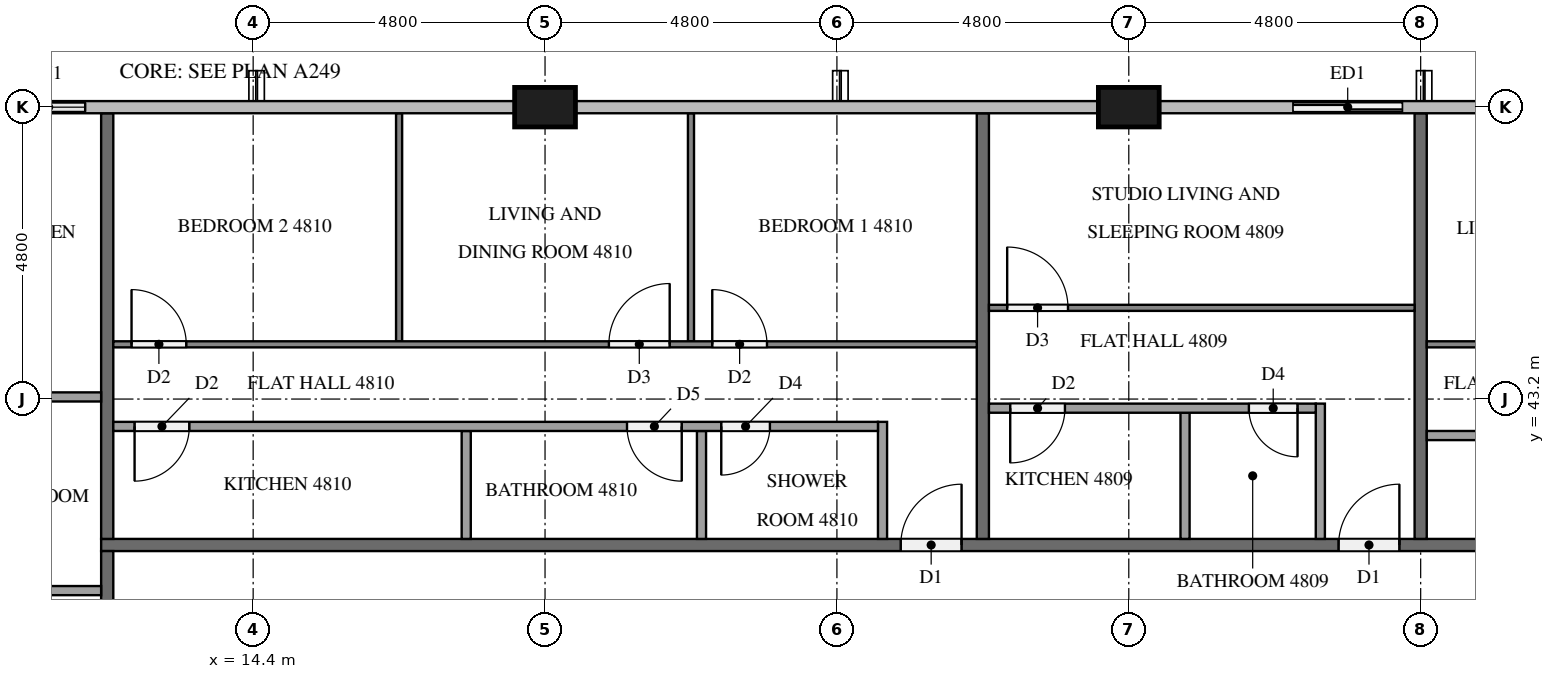
"""IFC4 building model, lengths in metres.
Left out: names, types, materials, properties, quantities, classifications, styles, units other than length and angle.
Written with IfcOpenShell. Run it as: python <this file> out.ifc"""

import sys

from ifc_helpers import new_model, si_unit, direction, frame, frame_2d, origin, origin_2d, place, context, subcontext, project, spatial, rectangle, extrude, element, fill, save


model = new_model("IFC4")
c1 = context("Model", 3, precision=1e-05, world=origin(), true_north=direction((0.0, 1.0)))
c2 = subcontext(c1, "Body", "Model", "MODEL_VIEW")
j1 = project(units=[si_unit("LENGTHUNIT", "METRE"), si_unit("PLANEANGLEUNIT", "RADIAN")], contexts=[c1])
p1 = place(None, origin())
s1 = spatial("IfcSite", under=j1, at=p1, CompositionType="ELEMENT")
p2 = place(p1, origin())
s2 = spatial("IfcBuilding", under=s1, at=p2, CompositionType="ELEMENT")
p3 = place(p2, frame((0.0, 0.0, 185.9)))
s3 = spatial("IfcBuildingStorey", under=s2, at=p3, CompositionType="ELEMENT", Elevation=185.9)
for number, where, z_axis, x_axis in (
    (1, (28.8, 48.0, 0.0), (0.0, 0.0, 1.0), (1.0, 0.0, 0.0)),
    (2, (19.2, 48.0, 0.0), (0.0, 0.0, 1.0), (1.0, 0.0, 0.0)),
):
    element("IfcColumn", number, at=place(p3, frame(where, z_axis=z_axis, x_axis=x_axis)), inside=s3, PredefinedType="COLUMN", context=c2, shape_type="SweptSolid", body=[
        extrude(rectangle(XDim=1.0, YDim=0.65, at=origin_2d()), origin(), (0.0, 0.0, 1.0), 3.2),
    ])
p4 = place(p3, frame((33.6, 48.0, 0.0), z_axis=(0.0, 0.0, 1.0), x_axis=(-1.0, 0.0, 0.0)))
e3 = element("IfcWall", 3, at=p4, inside=s3, PredefinedType="SOLIDWALL", context=c2, shape_type="SweptSolid", body=[
    extrude(rectangle(XDim=2.4, YDim=0.15, at=frame_2d((1.2, 0.0))), origin(), (0.0, 0.0, 1.0), 3.2),
])
p5 = place(p4, frame((0.3, 0.0, 0.0)))
e4 = element("IfcOpeningElement", 4, at=p5, cuts=e3, PredefinedType="OPENING", context=c2, shape_type="SweptSolid", body=[
    extrude(rectangle(XDim=1.8, YDim=2.4, at=frame_2d((0.9, 1.2))), frame((0.0, 0.085, 0.0), z_axis=(0.0, -1.0, 0.0), x_axis=(1.0, 0.0, 0.0)), (0.0, 0.0, 1.0), 0.17),
])
p6 = place(p3, frame((12.0, 48.0, 0.0), z_axis=(0.0, 0.0, 1.0), x_axis=(-1.0, 0.0, 0.0)))
e5 = element("IfcWall", 5, at=p6, inside=s3, PredefinedType="SOLIDWALL", context=c2, shape_type="SweptSolid", body=[
    extrude(rectangle(XDim=1.925, YDim=0.15, at=frame_2d((0.962, 0.0))), origin(), (0.0, 0.0, 1.0), 3.2),
])
p7 = place(p6, frame((0.363, 0.0, 0.9)))
e6 = element("IfcOpeningElement", 6, at=p7, cuts=e5, PredefinedType="OPENING", context=c2, shape_type="SweptSolid", body=[
    extrude(rectangle(XDim=1.2, YDim=1.4, at=frame_2d((0.6, 0.7))), frame((0.0, 0.085, 0.0), z_axis=(0.0, -1.0, 0.0), x_axis=(1.0, 0.0, 0.0)), (0.0, 0.0, 1.0), 0.17),
])
p8 = place(p3, frame((11.9, 40.8, 0.0), z_axis=(0.0, 0.0, 1.0), x_axis=(1.0, 0.0, 0.0)))
e7 = element("IfcWall", 7, at=p8, inside=s3, PredefinedType="PARTITIONING", context=c2, shape_type="SweptSolid", body=[
    extrude(rectangle(XDim=38.6, YDim=0.2, at=frame_2d((19.3, 0.0))), origin(), (0.0, 0.0, 1.0), 3.2),
])
p9 = place(p8, frame((37.15, 0.0, 0.0)))
e8 = element("IfcOpeningElement", 8, at=p9, cuts=e7, PredefinedType="OPENING", context=c2, shape_type="SweptSolid", body=[
    extrude(rectangle(XDim=1.0, YDim=2.1, at=frame_2d((0.5, 1.05))), frame((0.0, 0.11, 0.0), z_axis=(0.0, -1.0, 0.0), x_axis=(1.0, 0.0, 0.0)), (0.0, 0.0, 1.0), 0.22),
])
p10 = place(p8, frame((20.35, 0.0, 0.0)))
e9 = element("IfcOpeningElement", 9, at=p10, cuts=e7, PredefinedType="OPENING", context=c2, shape_type="SweptSolid", body=[
    extrude(rectangle(XDim=1.0, YDim=2.1, at=frame_2d((0.5, 1.05))), frame((0.0, 0.11, 0.0), z_axis=(0.0, -1.0, 0.0), x_axis=(1.0, 0.0, 0.0)), (0.0, 0.0, 1.0), 0.22),
])
p11 = place(p8, frame((13.15, 0.0, 0.0)))
e10 = element("IfcOpeningElement", 10, at=p11, cuts=e7, PredefinedType="OPENING", context=c2, shape_type="SweptSolid", body=[
    extrude(rectangle(XDim=1.0, YDim=2.1, at=frame_2d((0.5, 1.05))), frame((0.0, 0.11, 0.0), z_axis=(0.0, -1.0, 0.0), x_axis=(1.0, 0.0, 0.0)), (0.0, 0.0, 1.0), 0.22),
])
p12 = place(p3, frame((12.0, 12.1, 0.0), z_axis=(0.0, 0.0, 1.0), x_axis=(0.0, 1.0, 0.0)))
e11 = element("IfcWall", 11, at=p12, inside=s3, PredefinedType="PARTITIONING", context=c2, shape_type="SweptSolid", body=[
    extrude(rectangle(XDim=28.6, YDim=0.2, at=frame_2d((14.3, 0.0))), origin(), (0.0, 0.0, 1.0), 3.2),
])
p13 = place(p12, frame((26.65, 0.0, 0.0)))
e12 = element("IfcOpeningElement", 12, at=p13, cuts=e11, PredefinedType="OPENING", context=c2, shape_type="SweptSolid", body=[
    extrude(rectangle(XDim=1.0, YDim=2.1, at=frame_2d((0.5, 1.05))), frame((0.0, 0.11, 0.0), z_axis=(0.0, -1.0, 0.0), x_axis=(1.0, 0.0, 0.0)), (0.0, 0.0, 1.0), 0.22),
])
p14 = place(p12, frame((24.95, 0.0, 0.0)))
e13 = element("IfcOpeningElement", 13, at=p14, cuts=e11, PredefinedType="OPENING", context=c2, shape_type="SweptSolid", body=[
    extrude(rectangle(XDim=1.0, YDim=2.1, at=frame_2d((0.5, 1.05))), frame((0.0, 0.11, 0.0), z_axis=(0.0, -1.0, 0.0), x_axis=(1.0, 0.0, 0.0)), (0.0, 0.0, 1.0), 0.22),
])
p15 = place(p12, frame((12.95, 0.0, 0.0)))
e14 = element("IfcOpeningElement", 14, at=p15, cuts=e11, PredefinedType="OPENING", context=c2, shape_type="SweptSolid", body=[
    extrude(rectangle(XDim=1.0, YDim=2.1, at=frame_2d((0.5, 1.05))), frame((0.0, 0.11, 0.0), z_axis=(0.0, -1.0, 0.0), x_axis=(1.0, 0.0, 0.0)), (0.0, 0.0, 1.0), 0.22),
])
for number, where, z_axis, x_axis in (
    (15, (33.6, 47.9, 0.0), (0.0, 0.0, 1.0), (0.0, -1.0, 0.0)),
    (16, (26.4, 47.9, 0.0), (0.0, 0.0, 1.0), (0.0, -1.0, 0.0)),
    (17, (12.0, 47.9, 0.0), (0.0, 0.0, 1.0), (0.0, -1.0, 0.0)),
):
    element("IfcWall", number, at=place(p3, frame(where, z_axis=z_axis, x_axis=x_axis)), inside=s3, PredefinedType="PARTITIONING", context=c2, shape_type="SweptSolid", body=[
        extrude(rectangle(XDim=7.0, YDim=0.2, at=frame_2d((3.5, 0.0))), origin(), (0.0, 0.0, 1.0), 3.2),
    ])
p16 = place(p3, frame((33.7, 44.1, 0.0), z_axis=(0.0, 0.0, 1.0), x_axis=(1.0, 0.0, 0.0)))
e18 = element("IfcWall", 18, at=p16, inside=s3, PredefinedType="PARTITIONING", context=c2, shape_type="SweptSolid", body=[
    extrude(rectangle(XDim=16.6, YDim=0.1, at=frame_2d((8.3, 0.0))), origin(), (0.0, 0.0, 1.0), 3.2),
])
p17 = place(p16, frame((15.4, 0.0, 0.0)))
e19 = element("IfcOpeningElement", 19, at=p17, cuts=e18, PredefinedType="OPENING", context=c2, shape_type="SweptSolid", body=[
    extrude(rectangle(XDim=0.9, YDim=2.1, at=frame_2d((0.45, 1.05))), frame((0.0, 0.06, 0.0), z_axis=(0.0, -1.0, 0.0), x_axis=(1.0, 0.0, 0.0)), (0.0, 0.0, 1.0), 0.12),
])
p18 = place(p16, frame((7.45, 0.0, 0.0)))
e20 = element("IfcOpeningElement", 20, at=p18, cuts=e18, PredefinedType="OPENING", context=c2, shape_type="SweptSolid", body=[
    extrude(rectangle(XDim=0.9, YDim=2.1, at=frame_2d((0.45, 1.05))), frame((0.0, 0.06, 0.0), z_axis=(0.0, -1.0, 0.0), x_axis=(1.0, 0.0, 0.0)), (0.0, 0.0, 1.0), 0.12),
])
p19 = place(p16, frame((5.75, 0.0, 0.0)))
e21 = element("IfcOpeningElement", 21, at=p19, cuts=e18, PredefinedType="OPENING", context=c2, shape_type="SweptSolid", body=[
    extrude(rectangle(XDim=1.0, YDim=2.1, at=frame_2d((0.5, 1.05))), frame((0.0, 0.06, 0.0), z_axis=(0.0, -1.0, 0.0), x_axis=(1.0, 0.0, 0.0)), (0.0, 0.0, 1.0), 0.12),
])
p20 = place(p3, frame((48.675, 42.6, 0.0), z_axis=(0.0, 0.0, 1.0), x_axis=(-1.0, 0.0, 0.0)))
e22 = element("IfcWall", 22, at=p20, inside=s3, PredefinedType="PARTITIONING", context=c2, shape_type="SweptSolid", body=[
    extrude(rectangle(XDim=14.975, YDim=0.15, at=frame_2d((7.488, 0.0))), origin(), (0.0, 0.0, 1.0), 3.2),
])
p21 = place(p20, frame((0.3, 0.0, 0.0)))
e23 = element("IfcOpeningElement", 23, at=p21, cuts=e22, PredefinedType="OPENING", context=c2, shape_type="SweptSolid", body=[
    extrude(rectangle(XDim=0.8, YDim=2.1, at=frame_2d((0.4, 1.05))), frame((0.0, 0.085, 0.0), z_axis=(0.0, -1.0, 0.0), x_axis=(1.0, 0.0, 0.0)), (0.0, 0.0, 1.0), 0.17),
])
p22 = place(p20, frame((6.838, 0.0, 0.0)))
e24 = element("IfcOpeningElement", 24, at=p22, cuts=e22, PredefinedType="OPENING", context=c2, shape_type="SweptSolid", body=[
    extrude(rectangle(XDim=0.9, YDim=2.1, at=frame_2d((0.45, 1.05))), frame((0.0, 0.085, 0.0), z_axis=(0.0, -1.0, 0.0), x_axis=(1.0, 0.0, 0.0)), (0.0, 0.0, 1.0), 0.17),
])
p23 = place(p20, frame((8.388, 0.0, 0.0)))
e25 = element("IfcOpeningElement", 25, at=p23, cuts=e22, PredefinedType="OPENING", context=c2, shape_type="SweptSolid", body=[
    extrude(rectangle(XDim=0.9, YDim=2.1, at=frame_2d((0.45, 1.05))), frame((0.0, 0.085, 0.0), z_axis=(0.0, -1.0, 0.0), x_axis=(1.0, 0.0, 0.0)), (0.0, 0.0, 1.0), 0.17),
])
p24 = place(p3, frame((26.5, 44.7, 0.0), z_axis=(0.0, 0.0, 1.0), x_axis=(1.0, 0.0, 0.0)))
e26 = element("IfcWall", 26, at=p24, inside=s3, PredefinedType="PARTITIONING", context=c2, shape_type="SweptSolid", body=[
    extrude(rectangle(XDim=7.0, YDim=0.1, at=frame_2d((3.5, 0.0))), origin(), (0.0, 0.0, 1.0), 3.2),
])
p25 = place(p24, frame((0.3, 0.0, 0.0)))
e27 = element("IfcOpeningElement", 27, at=p25, cuts=e26, PredefinedType="OPENING", context=c2, shape_type="SweptSolid", body=[
    extrude(rectangle(XDim=1.0, YDim=2.1, at=frame_2d((0.5, 1.05))), frame((0.0, 0.06, 0.0), z_axis=(0.0, -1.0, 0.0), x_axis=(1.0, 0.0, 0.0)), (0.0, 0.0, 1.0), 0.12),
])
p26 = place(p3, frame((29.725, 40.9, 0.0), z_axis=(0.0, 0.0, 1.0), x_axis=(0.0, 1.0, 0.0)))
e28 = element("IfcWall", 28, at=p26, inside=s3, PredefinedType="PARTITIONING", context=c2, shape_type="SweptSolid", body=[
    extrude(rectangle(XDim=2.075, YDim=0.15, at=frame_2d((1.038, 0.0))), origin(), (0.0, 0.0, 1.0), 3.2),
])
p27 = place(p3, frame((31.95, 40.9, 0.0), z_axis=(0.0, 0.0, 1.0), x_axis=(0.0, 1.0, 0.0)))
e29 = element("IfcWall", 29, at=p27, inside=s3, PredefinedType="PARTITIONING", context=c2, shape_type="SweptSolid", body=[
    extrude(rectangle(XDim=2.225, YDim=0.15, at=frame_2d((1.113, 0.0))), origin(), (0.0, 0.0, 1.0), 3.2),
])
p28 = place(p3, frame((31.875, 43.05, 0.0), z_axis=(0.0, 0.0, 1.0), x_axis=(-1.0, 0.0, 0.0)))
e30 = element("IfcWall", 30, at=p28, inside=s3, PredefinedType="PARTITIONING", context=c2, shape_type="SweptSolid", body=[
    extrude(rectangle(XDim=5.375, YDim=0.15, at=frame_2d((2.688, 0.0))), origin(), (0.0, 0.0, 1.0), 3.2),
])
p29 = place(p28, frame((0.3, 0.0, 0.0)))
e31 = element("IfcOpeningElement", 31, at=p29, cuts=e30, PredefinedType="OPENING", context=c2, shape_type="SweptSolid", body=[
    extrude(rectangle(XDim=0.8, YDim=2.1, at=frame_2d((0.4, 1.05))), frame((0.0, 0.085, 0.0), z_axis=(0.0, -1.0, 0.0), x_axis=(1.0, 0.0, 0.0)), (0.0, 0.0, 1.0), 0.17),
])
p30 = place(p28, frame((4.125, 0.0, 0.0)))
e32 = element("IfcOpeningElement", 32, at=p30, cuts=e30, PredefinedType="OPENING", context=c2, shape_type="SweptSolid", body=[
    extrude(rectangle(XDim=0.9, YDim=2.1, at=frame_2d((0.45, 1.05))), frame((0.0, 0.085, 0.0), z_axis=(0.0, -1.0, 0.0), x_axis=(1.0, 0.0, 0.0)), (0.0, 0.0, 1.0), 0.17),
])
for number, where, z_axis, x_axis in (
    (33, (21.6, 44.15, 0.0), (0.0, 0.0, 1.0), (0.0, 1.0, 0.0)),
    (34, (16.8, 44.15, 0.0), (0.0, 0.0, 1.0), (0.0, 1.0, 0.0)),
):
    element("IfcWall", number, at=place(p3, frame(where, z_axis=z_axis, x_axis=x_axis)), inside=s3, PredefinedType="PARTITIONING", context=c2, shape_type="SweptSolid", body=[
        extrude(rectangle(XDim=3.75, YDim=0.1, at=frame_2d((1.875, 0.0))), origin(), (0.0, 0.0, 1.0), 3.2),
    ])
p31 = place(p3, frame((12.1, 44.1, 0.0), z_axis=(0.0, 0.0, 1.0), x_axis=(1.0, 0.0, 0.0)))
e35 = element("IfcWall", 35, at=p31, inside=s3, PredefinedType="PARTITIONING", context=c2, shape_type="SweptSolid", body=[
    extrude(rectangle(XDim=14.2, YDim=0.1, at=frame_2d((7.1, 0.0))), origin(), (0.0, 0.0, 1.0), 3.2),
])
p32 = place(p31, frame((9.85, 0.0, 0.0)))
e36 = element("IfcOpeningElement", 36, at=p32, cuts=e35, PredefinedType="OPENING", context=c2, shape_type="SweptSolid", body=[
    extrude(rectangle(XDim=0.9, YDim=2.1, at=frame_2d((0.45, 1.05))), frame((0.0, 0.06, 0.0), z_axis=(0.0, -1.0, 0.0), x_axis=(1.0, 0.0, 0.0)), (0.0, 0.0, 1.0), 0.12),
])
p33 = place(p31, frame((8.15, 0.0, 0.0)))
e37 = element("IfcOpeningElement", 37, at=p33, cuts=e35, PredefinedType="OPENING", context=c2, shape_type="SweptSolid", body=[
    extrude(rectangle(XDim=1.0, YDim=2.1, at=frame_2d((0.5, 1.05))), frame((0.0, 0.06, 0.0), z_axis=(0.0, -1.0, 0.0), x_axis=(1.0, 0.0, 0.0)), (0.0, 0.0, 1.0), 0.12),
])
p34 = place(p31, frame((0.3, 0.0, 0.0)))
e38 = element("IfcOpeningElement", 38, at=p34, cuts=e35, PredefinedType="OPENING", context=c2, shape_type="SweptSolid", body=[
    extrude(rectangle(XDim=0.9, YDim=2.1, at=frame_2d((0.45, 1.05))), frame((0.0, 0.06, 0.0), z_axis=(0.0, -1.0, 0.0), x_axis=(1.0, 0.0, 0.0)), (0.0, 0.0, 1.0), 0.12),
])
for number, where, z_axis, x_axis in (
    (39, (21.773, 40.9, 0.0), (0.0, 0.0, 1.0), (0.0, 1.0, 0.0)),
    (40, (17.904, 40.9, 0.0), (0.0, 0.0, 1.0), (0.0, 1.0, 0.0)),
):
    element("IfcWall", number, at=place(p3, frame(where, z_axis=z_axis, x_axis=x_axis)), inside=s3, PredefinedType="PARTITIONING", context=c2, shape_type="SweptSolid", body=[
        extrude(rectangle(XDim=1.775, YDim=0.15, at=frame_2d((0.888, 0.0))), origin(), (0.0, 0.0, 1.0), 3.2),
    ])
p35 = place(p3, frame((24.75, 40.9, 0.0), z_axis=(0.0, 0.0, 1.0), x_axis=(0.0, 1.0, 0.0)))
e41 = element("IfcWall", 41, at=p35, inside=s3, PredefinedType="PARTITIONING", context=c2, shape_type="SweptSolid", body=[
    extrude(rectangle(XDim=1.925, YDim=0.15, at=frame_2d((0.962, 0.0))), origin(), (0.0, 0.0, 1.0), 3.2),
])
p36 = place(p3, frame((24.675, 42.75, 0.0), z_axis=(0.0, 0.0, 1.0), x_axis=(-1.0, 0.0, 0.0)))
e42 = element("IfcWall", 42, at=p36, inside=s3, PredefinedType="PARTITIONING", context=c2, shape_type="SweptSolid", body=[
    extrude(rectangle(XDim=12.575, YDim=0.15, at=frame_2d((6.288, 0.0))), origin(), (0.0, 0.0, 1.0), 3.2),
])
p37 = place(p36, frame((1.777, 0.0, 0.0)))
e43 = element("IfcOpeningElement", 43, at=p37, cuts=e42, PredefinedType="OPENING", context=c2, shape_type="SweptSolid", body=[
    extrude(rectangle(XDim=0.8, YDim=2.1, at=frame_2d((0.4, 1.05))), frame((0.0, 0.085, 0.0), z_axis=(0.0, -1.0, 0.0), x_axis=(1.0, 0.0, 0.0)), (0.0, 0.0, 1.0), 0.17),
])
p38 = place(p36, frame((3.227, 0.0, 0.0)))
e44 = element("IfcOpeningElement", 44, at=p38, cuts=e42, PredefinedType="OPENING", context=c2, shape_type="SweptSolid", body=[
    extrude(rectangle(XDim=0.9, YDim=2.1, at=frame_2d((0.45, 1.05))), frame((0.0, 0.085, 0.0), z_axis=(0.0, -1.0, 0.0), x_axis=(1.0, 0.0, 0.0)), (0.0, 0.0, 1.0), 0.17),
])
p39 = place(p36, frame((11.325, 0.0, 0.0)))
e45 = element("IfcOpeningElement", 45, at=p39, cuts=e42, PredefinedType="OPENING", context=c2, shape_type="SweptSolid", body=[
    extrude(rectangle(XDim=0.9, YDim=2.1, at=frame_2d((0.45, 1.05))), frame((0.0, 0.085, 0.0), z_axis=(0.0, -1.0, 0.0), x_axis=(1.0, 0.0, 0.0)), (0.0, 0.0, 1.0), 0.17),
])
p40 = place(p3, frame((11.9, 43.235, 0.0), z_axis=(0.0, 0.0, 1.0), x_axis=(-1.0, 0.0, 0.0)))
e46 = element("IfcWall", 46, at=p40, inside=s3, PredefinedType="PARTITIONING", context=c2, shape_type="SweptSolid", body=[
    extrude(rectangle(XDim=2.225, YDim=0.15, at=frame_2d((1.112, 0.0))), origin(), (0.0, 0.0, 1.0), 3.2),
])
p41 = place(p3, frame((11.9, 40.05, 0.0), z_axis=(0.0, 0.0, 1.0), x_axis=(-1.0, 0.0, 0.0)))
e47 = element("IfcWall", 47, at=p41, inside=s3, PredefinedType="PARTITIONING", context=c2, shape_type="SweptSolid", body=[
    extrude(rectangle(XDim=2.375, YDim=0.15, at=frame_2d((1.188, 0.0))), origin(), (0.0, 0.0, 1.0), 3.2),
])
p42 = place(p5, origin())
e48 = element("IfcDoor", 48, at=p42, inside=s3, OperationType="SLIDING_TO_LEFT", PredefinedType="DOOR", context=c2, shape_type="SweptSolid", body=[
    extrude(rectangle(XDim=1.8, YDim=2.4, at=frame_2d((0.9, 1.2))), frame((0.0, 0.025, 0.0), z_axis=(0.0, -1.0, 0.0), x_axis=(1.0, 0.0, 0.0)), (0.0, 0.0, 1.0), 0.05),
])
fill(e4, e48)
p43 = place(p7, origin())
e49 = element("IfcWindow", 49, at=p43, inside=s3, PartitioningType="SINGLE_PANEL", PredefinedType="WINDOW", context=c2, shape_type="SweptSolid", body=[
    extrude(rectangle(XDim=1.2, YDim=1.4, at=frame_2d((0.6, 0.7))), frame((0.0, 0.03, 0.0), z_axis=(0.0, -1.0, 0.0), x_axis=(1.0, 0.0, 0.0)), (0.0, 0.0, 1.0), 0.06),
])
fill(e6, e49)
p44 = place(p10, origin())
e50 = element("IfcDoor", 50, at=p44, inside=s3, OperationType="SINGLE_SWING_RIGHT", PredefinedType="DOOR", context=c2, shape_type="SweptSolid", body=[
    extrude(rectangle(XDim=1.0, YDim=2.1, at=frame_2d((0.5, 1.05))), frame((0.0, 0.025, 0.0), z_axis=(0.0, -1.0, 0.0), x_axis=(1.0, 0.0, 0.0)), (0.0, 0.0, 1.0), 0.05),
])
fill(e9, e50)
p45 = place(p11, origin())
e51 = element("IfcDoor", 51, at=p45, inside=s3, OperationType="SINGLE_SWING_RIGHT", PredefinedType="DOOR", context=c2, shape_type="SweptSolid", body=[
    extrude(rectangle(XDim=1.0, YDim=2.1, at=frame_2d((0.5, 1.05))), frame((0.0, 0.025, 0.0), z_axis=(0.0, -1.0, 0.0), x_axis=(1.0, 0.0, 0.0)), (0.0, 0.0, 1.0), 0.05),
])
fill(e10, e51)
p46 = place(p25, origin())
e52 = element("IfcDoor", 52, at=p46, inside=s3, OperationType="SINGLE_SWING_LEFT", PredefinedType="DOOR", context=c2, shape_type="SweptSolid", body=[
    extrude(rectangle(XDim=1.0, YDim=2.1, at=frame_2d((0.5, 1.05))), frame((0.0, 0.025, 0.0), z_axis=(0.0, -1.0, 0.0), x_axis=(1.0, 0.0, 0.0)), (0.0, 0.0, 1.0), 0.05),
])
fill(e27, e52)
p47 = place(p29, origin())
e53 = element("IfcDoor", 53, at=p47, inside=s3, OperationType="SINGLE_SWING_LEFT", PredefinedType="DOOR", context=c2, shape_type="SweptSolid", body=[
    extrude(rectangle(XDim=0.8, YDim=2.1, at=frame_2d((0.4, 1.05))), frame((0.0, 0.025, 0.0), z_axis=(0.0, -1.0, 0.0), x_axis=(1.0, 0.0, 0.0)), (0.0, 0.0, 1.0), 0.05),
])
fill(e31, e53)
p48 = place(p30, origin())
e54 = element("IfcDoor", 54, at=p48, inside=s3, OperationType="SINGLE_SWING_RIGHT", PredefinedType="DOOR", context=c2, shape_type="SweptSolid", body=[
    extrude(rectangle(XDim=0.9, YDim=2.1, at=frame_2d((0.45, 1.05))), frame((0.0, 0.025, 0.0), z_axis=(0.0, -1.0, 0.0), x_axis=(1.0, 0.0, 0.0)), (0.0, 0.0, 1.0), 0.05),
])
fill(e32, e54)
p49 = place(p32, origin())
e55 = element("IfcDoor", 55, at=p49, inside=s3, OperationType="SINGLE_SWING_LEFT", PredefinedType="DOOR", context=c2, shape_type="SweptSolid", body=[
    extrude(rectangle(XDim=0.9, YDim=2.1, at=frame_2d((0.45, 1.05))), frame((0.0, 0.025, 0.0), z_axis=(0.0, -1.0, 0.0), x_axis=(1.0, 0.0, 0.0)), (0.0, 0.0, 1.0), 0.05),
])
fill(e36, e55)
p50 = place(p33, origin())
e56 = element("IfcDoor", 56, at=p50, inside=s3, OperationType="SINGLE_SWING_RIGHT", PredefinedType="DOOR", context=c2, shape_type="SweptSolid", body=[
    extrude(rectangle(XDim=1.0, YDim=2.1, at=frame_2d((0.5, 1.05))), frame((0.0, 0.025, 0.0), z_axis=(0.0, -1.0, 0.0), x_axis=(1.0, 0.0, 0.0)), (0.0, 0.0, 1.0), 0.05),
])
fill(e37, e56)
p51 = place(p34, origin())
e57 = element("IfcDoor", 57, at=p51, inside=s3, OperationType="SINGLE_SWING_LEFT", PredefinedType="DOOR", context=c2, shape_type="SweptSolid", body=[
    extrude(rectangle(XDim=0.9, YDim=2.1, at=frame_2d((0.45, 1.05))), frame((0.0, 0.025, 0.0), z_axis=(0.0, -1.0, 0.0), x_axis=(1.0, 0.0, 0.0)), (0.0, 0.0, 1.0), 0.05),
])
fill(e38, e57)
p52 = place(p37, origin())
e58 = element("IfcDoor", 58, at=p52, inside=s3, OperationType="SINGLE_SWING_RIGHT", PredefinedType="DOOR", context=c2, shape_type="SweptSolid", body=[
    extrude(rectangle(XDim=0.8, YDim=2.1, at=frame_2d((0.4, 1.05))), frame((0.0, 0.025, 0.0), z_axis=(0.0, -1.0, 0.0), x_axis=(1.0, 0.0, 0.0)), (0.0, 0.0, 1.0), 0.05),
])
fill(e43, e58)
p53 = place(p38, origin())
e59 = element("IfcDoor", 59, at=p53, inside=s3, OperationType="SINGLE_SWING_LEFT", PredefinedType="DOOR", context=c2, shape_type="SweptSolid", body=[
    extrude(rectangle(XDim=0.9, YDim=2.1, at=frame_2d((0.45, 1.05))), frame((0.0, 0.025, 0.0), z_axis=(0.0, -1.0, 0.0), x_axis=(1.0, 0.0, 0.0)), (0.0, 0.0, 1.0), 0.05),
])
fill(e44, e59)
p54 = place(p39, origin())
e60 = element("IfcDoor", 60, at=p54, inside=s3, OperationType="SINGLE_SWING_RIGHT", PredefinedType="DOOR", context=c2, shape_type="SweptSolid", body=[
    extrude(rectangle(XDim=0.9, YDim=2.1, at=frame_2d((0.45, 1.05))), frame((0.0, 0.025, 0.0), z_axis=(0.0, -1.0, 0.0), x_axis=(1.0, 0.0, 0.0)), (0.0, 0.0, 1.0), 0.05),
])
fill(e45, e60)
save(model, sys.argv[1])
